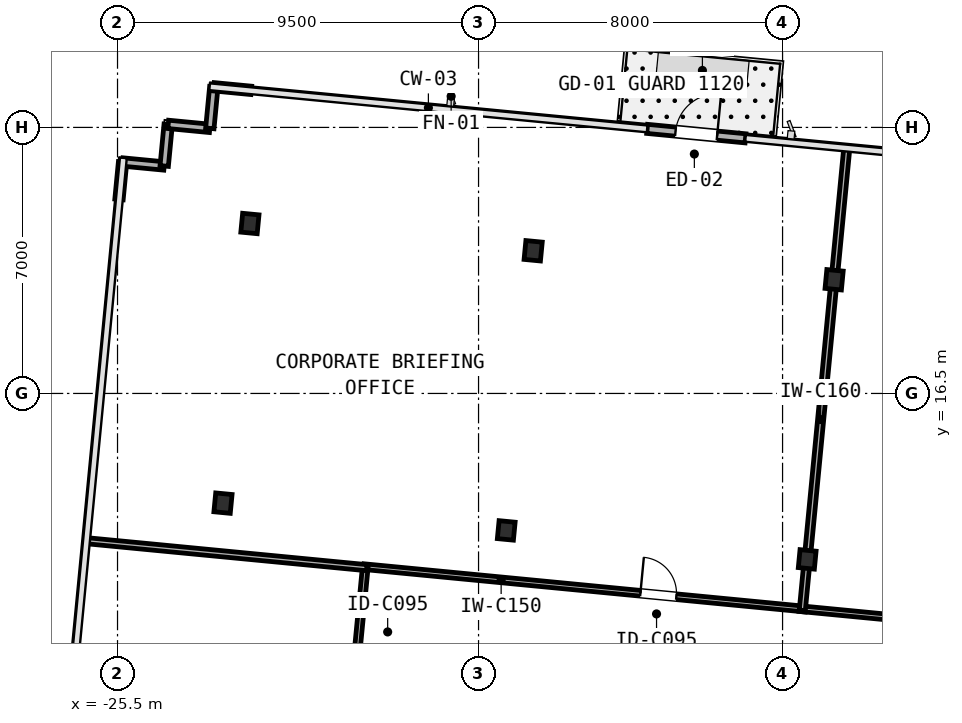
"""IFC4 building model, lengths in metres.
Left out: names, types, materials, properties, quantities, classifications, styles, units other than length and angle.
Written with IfcOpenShell. Run it as: python <this file> out.ifc"""

import sys

from ifc_helpers import new_model, si_unit, direction, frame, frame_2d, origin, origin_2d, place, context, subcontext, project, spatial, rectangle, i_section, extrude, element, fill, save


model = new_model("IFC4")
c1 = context("Model", 3, precision=1e-05, world=origin(), true_north=direction((0.0, 1.0)))
c2 = subcontext(c1, "Body", "Model", "MODEL_VIEW")
j1 = project(units=[si_unit("LENGTHUNIT", "METRE"), si_unit("PLANEANGLEUNIT", "RADIAN")], contexts=[c1])
p1 = place(None, origin())
s1 = spatial("IfcSite", under=j1, at=p1, CompositionType="ELEMENT")
p2 = place(p1, origin())
s2 = spatial("IfcBuilding", under=s1, at=p2, CompositionType="ELEMENT")
p3 = place(p2, frame((0.0, 0.0, 160.05)))
s3 = spatial("IfcBuildingStorey", under=s2, at=p3, CompositionType="ELEMENT", Elevation=160.05)
for number, where, z_axis, x_axis in (
    (1, (-22.725, 13.614, 0.0), (0.0, 0.0, 1.0), (0.995, -0.096, 0.0)),
    (2, (-22.016, 20.972, 0.0), (0.0, 0.0, 1.0), (0.995, -0.096, 0.0)),
):
    element("IfcColumn", number, at=place(p3, frame(where, z_axis=z_axis, x_axis=x_axis)), inside=s3, PredefinedType="COLUMN", context=c2, shape_type="SweptSolid", body=[
        extrude(i_section(OverallWidth=0.432, OverallDepth=0.498, WebThickness=0.056, FlangeThickness=0.089, FilletRadius=0.031, at=origin_2d()), origin(), (0.0, 0.0, 1.0), 3.45),
    ])
p4 = place(p3, frame((-15.271, 12.896, 0.0), z_axis=(0.0, 0.0, 1.0), x_axis=(0.995396198367, -0.09584575252, 0.0)))
e3 = element("IfcColumn", 3, at=p4, inside=s3, PredefinedType="COLUMN", context=c2, shape_type="SweptSolid", body=[
    extrude(i_section(OverallWidth=0.424, OverallDepth=0.474, WebThickness=0.048, FlangeThickness=0.077, FilletRadius=0.031, at=origin_2d()), origin(), (0.0, 0.0, 1.0), 3.45),
])
p5 = place(p3, frame((-14.563, 20.254, 0.0), z_axis=(0.0, 0.0, 1.0), x_axis=(0.995396198367, -0.09584575252, 0.0)))
e4 = element("IfcColumn", 4, at=p5, inside=s3, PredefinedType="COLUMN", context=c2, shape_type="SweptSolid", body=[
    extrude(i_section(OverallWidth=0.432, OverallDepth=0.498, WebThickness=0.056, FlangeThickness=0.089, FilletRadius=0.031, at=origin_2d()), origin(), (0.0, 0.0, 1.0), 3.45),
])
p6 = place(p3, frame((-7.352, 12.134, 0.0), z_axis=(0.0, 0.0, 1.0), x_axis=(0.995396198367, -0.09584575252, 0.0)))
e5 = element("IfcColumn", 5, at=p6, inside=s3, PredefinedType="COLUMN", context=c2, shape_type="SweptSolid", body=[
    extrude(i_section(OverallWidth=0.424, OverallDepth=0.474, WebThickness=0.048, FlangeThickness=0.077, FilletRadius=0.031, at=origin_2d()), origin(), (0.0, 0.0, 1.0), 3.45),
])
p7 = place(p3, frame((-6.643, 19.492, 0.0), z_axis=(0.0, 0.0, 1.0), x_axis=(0.995396198367, -0.09584575252, 0.0)))
e6 = element("IfcColumn", 6, at=p7, inside=s3, PredefinedType="COLUMN", context=c2, shape_type="SweptSolid", body=[
    extrude(i_section(OverallWidth=0.432, OverallDepth=0.498, WebThickness=0.056, FlangeThickness=0.089, FilletRadius=0.031, at=origin_2d()), origin(), (0.0, 0.0, 1.0), 3.45),
])
p8 = place(p3, frame((-11.563, 23.461, 0.0), z_axis=(0.0, 0.0, 1.0), x_axis=(0.995402144456, -0.095783979938, 0.0)))
e7 = element("IfcWall", 7, at=p8, inside=s3, PredefinedType="STANDARD", context=c2, shape_type="SweptSolid", body=[
    extrude(rectangle(XDim=2.6, YDim=0.24, at=frame_2d((1.3, 0.0))), origin(), (0.0, 0.0, 1.0), 3.19),
])
p9 = place(p8, frame((0.75, 0.0, 0.0)))
e8 = element("IfcOpeningElement", 8, at=p9, cuts=e7, PredefinedType="OPENING", context=c2, shape_type="SweptSolid", body=[
    extrude(rectangle(XDim=1.1, YDim=2.15, at=frame_2d((0.55, 1.075))), frame((0.0, 0.13, 0.0), z_axis=(0.0, -1.0, 0.0), x_axis=(1.0, 0.0, 0.0)), (0.0, 0.0, 1.0), 0.26),
])
p10 = place(p3, frame((-25.461, 21.605, 0.0), z_axis=(0.0, 0.0, 1.0), x_axis=(0.095937974524, 0.995387314086, 0.0)))
e9 = element("IfcWall", 9, at=p10, inside=s3, PredefinedType="STANDARD", context=c2, shape_type="SweptSolid", body=[
    extrude(rectangle(XDim=0.99, YDim=0.22, at=frame_2d((0.495, 0.0))), origin(), (0.0, 0.0, 1.0), 3.19),
])
for number, where, z_axis, x_axis in (
    (10, (-25.366, 22.59, 0.0), (0.0, 0.0, 1.0), (0.995, -0.096, 0.0)),
    (11, (-24.271, 22.485, 0.0), (0.0, 0.0, 1.0), (0.096, 0.995, 0.0)),
    (12, (-24.166, 23.58, 0.0), (0.0, 0.0, 1.0), (0.995, -0.096, 0.0)),
    (13, (-23.071, 23.475, 0.0), (0.0, 0.0, 1.0), (0.096, 0.995, 0.0)),
):
    element("IfcWall", number, at=place(p3, frame(where, z_axis=z_axis, x_axis=x_axis)), inside=s3, PredefinedType="STANDARD", context=c2, shape_type="SweptSolid", body=[
        extrude(rectangle(XDim=1.1, YDim=0.22, at=frame_2d((0.55, 0.0))), origin(), (0.0, 0.0, 1.0), 3.19),
    ])
p11 = place(p3, frame((-22.966, 24.57, 0.0), z_axis=(0.0, 0.0, 1.0), x_axis=(0.995387314086, -0.095937974524, 0.0)))
e14 = element("IfcWall", 14, at=p11, inside=s3, PredefinedType="STANDARD", context=c2, shape_type="SweptSolid", body=[
    extrude(rectangle(XDim=0.99, YDim=0.22, at=frame_2d((0.495, 0.0))), origin(), (0.0, 0.0, 1.0), 3.19),
])
p12 = place(p3, frame((-19.02, 11.943, 0.0), z_axis=(0.0, 0.0, 1.0), x_axis=(0.995395421372, -0.095853821582, 0.0)))
e15 = element("IfcWall", 15, at=p12, inside=s3, PredefinedType="PARTITIONING", context=c2, shape_type="SweptSolid", body=[
    extrude(rectangle(XDim=11.678, YDim=0.15, at=frame_2d((5.839, 0.0))), origin(), (0.0, 0.0, 1.0), 2.479),
])
p13 = place(p12, frame((7.312, 0.0, 0.0)))
e16 = element("IfcOpeningElement", 16, at=p13, cuts=e15, PredefinedType="OPENING", context=c2, shape_type="SweptSolid", body=[
    extrude(rectangle(XDim=0.95, YDim=2.15, at=frame_2d((0.475, 1.075))), frame((0.0, 0.085, 0.0), z_axis=(0.0, -1.0, 0.0), x_axis=(1.0, 0.0, 0.0)), (0.0, 0.0, 1.0), 0.17),
])
p14 = place(p3, frame((-7.559, 10.84, 0.0), z_axis=(0.0, 0.0, 1.0), x_axis=(0.995396443768, -0.095843203903, 0.0)))
e17 = element("IfcWall", 17, at=p14, inside=s3, PredefinedType="PARTITIONING", context=c2, shape_type="SweptSolid", body=[
    extrude(rectangle(XDim=16.076, YDim=0.15, at=frame_2d((8.038, 0.0))), origin(), (0.0, 0.0, 1.0), 2.479),
])
p15 = place(p14, frame((3.532, 0.0, 0.0)))
e18 = element("IfcOpeningElement", 18, at=p15, cuts=e17, PredefinedType="OPENING", context=c2, shape_type="SweptSolid", body=[
    extrude(rectangle(XDim=0.95, YDim=2.15, at=frame_2d((0.475, 1.075))), frame((0.0, 0.085, 0.0), z_axis=(0.0, -1.0, 0.0), x_axis=(1.0, 0.0, 0.0)), (0.0, 0.0, 1.0), 0.17),
])
p16 = place(p3, frame((-19.19, 9.759, 0.0), z_axis=(0.0, 0.0, 1.0), x_axis=(0.095882898123, 0.995392620953, 0.0)))
e19 = element("IfcWall", 19, at=p16, inside=s3, PredefinedType="PARTITIONING", context=c2, shape_type="SweptSolid", body=[
    extrude(rectangle(XDim=2.21, YDim=0.15, at=frame_2d((1.105, 0.0))), origin(), (0.0, 0.0, 1.0), 2.718),
])
p17 = place(p3, frame((-7.369, 11.958, 0.0), z_axis=(0.0, 0.0, 1.0), x_axis=(-0.095831494917, -0.995397571115, 0.0)))
e20 = element("IfcWall", 20, at=p17, inside=s3, PredefinedType="PARTITIONING", context=c2, shape_type="SweptSolid", body=[
    extrude(rectangle(XDim=1.172, YDim=0.16, at=frame_2d((0.586, 0.0))), origin(), (0.0, 0.0, 1.0), 2.479),
])
p18 = place(p3, frame((-6.66, 19.316, 0.0), z_axis=(0.0, 0.0, 1.0), x_axis=(-0.095853155488, -0.995395485515, 0.0)))
e21 = element("IfcWall", 21, at=p18, inside=s3, PredefinedType="PARTITIONING", context=c2, shape_type="SweptSolid", body=[
    extrude(rectangle(XDim=7.04, YDim=0.16, at=frame_2d((3.52, 0.0))), origin(), (0.0, 0.0, 1.0), 2.479),
])
p19 = place(p3, frame((-6.306, 22.995, 0.0), z_axis=(0.0, 0.0, 1.0), x_axis=(-0.095859866796, -0.995394839216, 0.0)))
e22 = element("IfcWall", 22, at=p19, inside=s3, PredefinedType="PARTITIONING", context=c2, shape_type="SweptSolid", body=[
    extrude(rectangle(XDim=3.344, YDim=0.16, at=frame_2d((1.672, 0.0))), origin(), (0.0, 0.0, 1.0), 3.19),
])
p20 = place(p3, frame((-18.942, 11.916, 0.0), z_axis=(0.0, 0.0, 1.0), x_axis=(-0.995395927026, 0.095848570461, 0.0)))
e23 = element("IfcWall", 23, at=p20, inside=s3, PredefinedType="PARTITIONING", context=c2, shape_type="SweptSolid", body=[
    extrude(rectangle(XDim=7.448, YDim=0.16, at=frame_2d((3.724, 0.0))), origin(), (0.0, 0.0, 1.0), 2.557),
])
p21 = place(p9, origin())
e24 = element("IfcDoor", 24, at=p21, inside=s3, OperationType="SINGLE_SWING_RIGHT", PredefinedType="DOOR", context=c2, shape_type="SweptSolid", body=[
    extrude(rectangle(XDim=1.1, YDim=2.15, at=frame_2d((0.55, 1.075))), frame((0.0, 0.025, 0.0), z_axis=(0.0, -1.0, 0.0), x_axis=(1.0, 0.0, 0.0)), (0.0, 0.0, 1.0), 0.05),
])
fill(e8, e24)
p22 = place(p13, frame((0.95, 0.0, 0.0), z_axis=(0.0, 0.0, 1.0), x_axis=(-1.0, 0.0, 0.0)))
e25 = element("IfcDoor", 25, at=p22, inside=s3, OperationType="SINGLE_SWING_LEFT", PredefinedType="DOOR", context=c2, shape_type="SweptSolid", body=[
    extrude(rectangle(XDim=0.95, YDim=2.15, at=frame_2d((0.475, 1.075))), frame((0.0, 0.025, 0.0), z_axis=(0.0, -1.0, 0.0), x_axis=(1.0, 0.0, 0.0)), (0.0, 0.0, 1.0), 0.05),
])
fill(e16, e25)
save(model, sys.argv[1])
